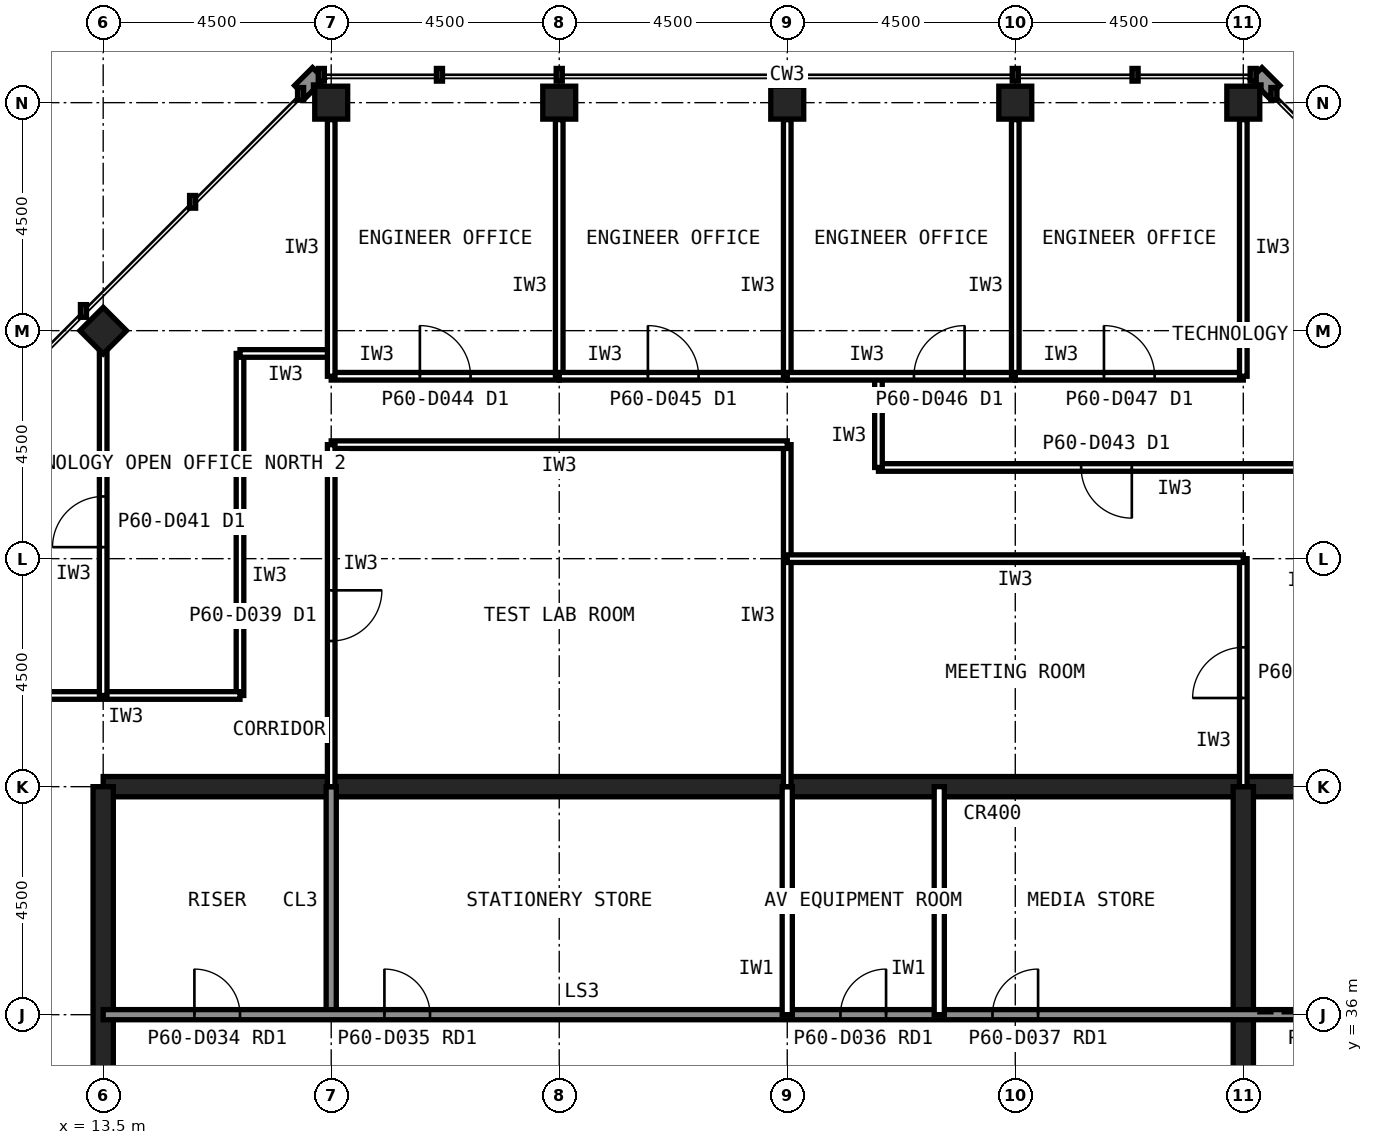
"""IFC4 building model, lengths in metres.
Left out: names, types, materials, properties, quantities, classifications, styles, units other than length and angle.
Written with IfcOpenShell. Run it as: python <this file> out.ifc"""

import sys

from ifc_helpers import new_model, si_unit, direction, frame, frame_2d, origin, origin_2d, place, context, subcontext, project, spatial, rectangle, hollow_rectangle, extrude, element, fill, save


model = new_model("IFC4")
c1 = context("Model", 3, precision=1e-05, world=origin(), true_north=direction((0.0, 1.0)))
c2 = subcontext(c1, "Body", "Model", "MODEL_VIEW")
j1 = project(units=[si_unit("LENGTHUNIT", "METRE"), si_unit("PLANEANGLEUNIT", "RADIAN")], contexts=[c1])
p1 = place(None, origin())
s1 = spatial("IfcSite", under=j1, at=p1, CompositionType="ELEMENT")
p2 = place(p1, origin())
s2 = spatial("IfcBuilding", under=s1, at=p2, CompositionType="ELEMENT")
p3 = place(p2, frame((0.0, 0.0, 254.6)))
s3 = spatial("IfcBuildingStorey", under=s2, at=p3, CompositionType="ELEMENT", Elevation=254.6)
for number, where, z_axis, x_axis in (
    (1, (36.0, 54.0, 0.0), (0.0, 0.0, 1.0), (1.0, 0.0, 0.0)),
    (2, (31.5, 54.0, 0.0), (0.0, 0.0, 1.0), (1.0, 0.0, 0.0)),
    (3, (27.0, 54.0, 0.0), (0.0, 0.0, 1.0), (1.0, 0.0, 0.0)),
    (4, (22.5, 54.0, 0.0), (0.0, 0.0, 1.0), (1.0, 0.0, 0.0)),
    (5, (18.0, 54.0, 0.0), (0.0, 0.0, 1.0), (1.0, 0.0, 0.0)),
    (6, (13.5, 49.5, 0.0), (0.0, 0.0, 1.0), (0.707, 0.707, 0.0)),
):
    element("IfcColumn", number, at=place(p3, frame(where, z_axis=z_axis, x_axis=x_axis)), inside=s3, PredefinedType="COLUMN", context=c2, shape_type="SweptSolid", body=[
        extrude(hollow_rectangle(XDim=0.65, YDim=0.65, WallThickness=0.032, at=origin_2d()), origin(), (0.0, 0.0, 1.0), 4.0),
    ])
p4 = place(p3, frame((40.5, 40.5, 0.0), z_axis=(0.0, 0.0, 1.0), x_axis=(-1.0, 0.0, 0.0)))
e7 = element("IfcWall", 7, at=p4, inside=s3, PredefinedType="SHEAR", context=c2, shape_type="SweptSolid", body=[
    extrude(rectangle(XDim=27.0, YDim=0.4, at=frame_2d((13.5, 0.0))), origin(), (0.0, 0.0, 1.0), 4.0),
])
p5 = place(p3, frame((13.5, 40.5, 0.0), z_axis=(0.0, 0.0, 1.0), x_axis=(0.0, -1.0, 0.0)))
e8 = element("IfcWall", 8, at=p5, inside=s3, PredefinedType="SHEAR", context=c2, shape_type="SweptSolid", body=[
    extrude(rectangle(XDim=27.0, YDim=0.4, at=frame_2d((13.5, 0.0))), origin(), (0.0, 0.0, 1.0), 4.0),
])
p6 = place(p5, frame((19.65, 0.0, 0.0)))
e9 = element("IfcOpeningElement", 9, at=p6, cuts=e8, PredefinedType="OPENING", context=c2, shape_type="SweptSolid", body=[
    extrude(rectangle(XDim=1.2, YDim=2.1, at=frame_2d((0.6, 1.05))), frame((0.0, 0.21, 0.0), z_axis=(0.0, -1.0, 0.0), x_axis=(1.0, 0.0, 0.0)), (0.0, 0.0, 1.0), 0.42),
])
p7 = place(p5, frame((5.85, 0.0, 0.0)))
e10 = element("IfcOpeningElement", 10, at=p7, cuts=e8, PredefinedType="OPENING", context=c2, shape_type="SweptSolid", body=[
    extrude(rectangle(XDim=1.8, YDim=2.1, at=frame_2d((0.9, 1.05))), frame((0.0, 0.21, 0.0), z_axis=(0.0, -1.0, 0.0), x_axis=(1.0, 0.0, 0.0)), (0.0, 0.0, 1.0), 0.42),
])
p8 = place(p3, frame((18.0, 36.0, 0.0), z_axis=(0.0, 0.0, 1.0), x_axis=(0.0, 1.0, 0.0)))
e11 = element("IfcWall", 11, at=p8, inside=s3, PredefinedType="SOLIDWALL", context=c2, shape_type="SweptSolid", body=[
    extrude(rectangle(XDim=4.5, YDim=0.2, at=frame_2d((2.25, 0.0))), origin(), (0.0, 0.0, 1.0), 3.84),
])
p9 = place(p3, frame((36.0, 22.5, 0.0), z_axis=(0.0, 0.0, 1.0), x_axis=(0.0, 1.0, 0.0)))
e12 = element("IfcWall", 12, at=p9, inside=s3, PredefinedType="SHEAR", context=c2, shape_type="SweptSolid", body=[
    extrude(rectangle(XDim=18.0, YDim=0.4, at=frame_2d((9.0, 0.0))), origin(), (0.0, 0.0, 1.0), 4.0),
])
p10 = place(p3, frame((13.5, 36.0, 0.0), z_axis=(0.0, 0.0, 1.0), x_axis=(1.0, 0.0, 0.0)))
e13 = element("IfcWall", 13, at=p10, inside=s3, PredefinedType="SOLIDWALL", context=c2, shape_type="SweptSolid", body=[
    extrude(rectangle(XDim=27.0, YDim=0.2, at=frame_2d((13.5, 0.0))), origin(), (0.0, 0.0, 1.0), 3.84),
])
p11 = place(p10, frame((1.8, 0.0, 0.0)))
e14 = element("IfcOpeningElement", 14, at=p11, cuts=e13, PredefinedType="OPENING", context=c2, shape_type="SweptSolid", body=[
    extrude(rectangle(XDim=0.9, YDim=2.1, at=frame_2d((0.45, 1.05))), frame((0.0, 0.11, 0.0), z_axis=(0.0, -1.0, 0.0), x_axis=(1.0, 0.0, 0.0)), (0.0, 0.0, 1.0), 0.22),
])
p12 = place(p10, frame((5.55, 0.0, 0.0)))
e15 = element("IfcOpeningElement", 15, at=p12, cuts=e13, PredefinedType="OPENING", context=c2, shape_type="SweptSolid", body=[
    extrude(rectangle(XDim=0.9, YDim=2.1, at=frame_2d((0.45, 1.05))), frame((0.0, 0.11, 0.0), z_axis=(0.0, -1.0, 0.0), x_axis=(1.0, 0.0, 0.0)), (0.0, 0.0, 1.0), 0.22),
])
p13 = place(p10, frame((14.55, 0.0, 0.0)))
e16 = element("IfcOpeningElement", 16, at=p13, cuts=e13, PredefinedType="OPENING", context=c2, shape_type="SweptSolid", body=[
    extrude(rectangle(XDim=0.9, YDim=2.1, at=frame_2d((0.45, 1.05))), frame((0.0, 0.11, 0.0), z_axis=(0.0, -1.0, 0.0), x_axis=(1.0, 0.0, 0.0)), (0.0, 0.0, 1.0), 0.22),
])
p14 = place(p10, frame((17.55, 0.0, 0.0)))
e17 = element("IfcOpeningElement", 17, at=p14, cuts=e13, PredefinedType="OPENING", context=c2, shape_type="SweptSolid", body=[
    extrude(rectangle(XDim=0.9, YDim=2.1, at=frame_2d((0.45, 1.05))), frame((0.0, 0.11, 0.0), z_axis=(0.0, -1.0, 0.0), x_axis=(1.0, 0.0, 0.0)), (0.0, 0.0, 1.0), 0.22),
])
p15 = place(p10, frame((24.1, 0.0, 0.0)))
e18 = element("IfcOpeningElement", 18, at=p15, cuts=e13, PredefinedType="OPENING", context=c2, shape_type="SweptSolid", body=[
    extrude(rectangle(XDim=1.3, YDim=2.2, at=frame_2d((0.65, 1.1))), frame((0.0, 0.11, 0.0), z_axis=(0.0, -1.0, 0.0), x_axis=(1.0, 0.0, 0.0)), (0.0, 0.0, 1.0), 0.22),
])
for number, where, z_axis, x_axis in (
    (19, (27.0, 36.0, 0.0), (0.0, 0.0, 1.0), (0.0, 1.0, 0.0)),
    (20, (30.0, 36.0, 0.0), (0.0, 0.0, 1.0), (0.0, 1.0, 0.0)),
):
    element("IfcWall", number, at=place(p3, frame(where, z_axis=z_axis, x_axis=x_axis)), inside=s3, PredefinedType="PARTITIONING", context=c2, shape_type="SweptSolid", body=[
        extrude(rectangle(XDim=4.5, YDim=0.2, at=frame_2d((2.25, 0.0))), origin(), (0.0, 0.0, 1.0), 3.84),
    ])
p16 = place(p3, frame((37.8, 46.8, 0.0), z_axis=(0.0, 0.0, 1.0), x_axis=(-1.0, 0.0, 0.0)))
e21 = element("IfcWall", 21, at=p16, inside=s3, PredefinedType="PARTITIONING", context=c2, shape_type="SweptSolid", body=[
    extrude(rectangle(XDim=9.0, YDim=0.15, at=frame_2d((4.5, 0.0))), origin(), (0.0, 0.0, 1.0), 3.84),
])
p17 = place(p16, frame((4.0, 0.0, 0.0)))
e22 = element("IfcOpeningElement", 22, at=p17, cuts=e21, PredefinedType="OPENING", context=c2, shape_type="SweptSolid", body=[
    extrude(rectangle(XDim=1.0, YDim=2.1, at=frame_2d((0.5, 1.05))), frame((0.0, 0.085, 0.0), z_axis=(0.0, -1.0, 0.0), x_axis=(1.0, 0.0, 0.0)), (0.0, 0.0, 1.0), 0.17),
])
p18 = place(p3, frame((16.2, 49.05, 0.0), z_axis=(0.0, 0.0, 1.0), x_axis=(0.0, -1.0, 0.0)))
e23 = element("IfcWall", 23, at=p18, inside=s3, PredefinedType="PARTITIONING", context=c2, shape_type="SweptSolid", body=[
    extrude(rectangle(XDim=6.75, YDim=0.15, at=frame_2d((3.375, 0.0))), origin(), (0.0, 0.0, 1.0), 3.84),
])
p19 = place(p3, frame((16.2, 42.3, 0.0), z_axis=(0.0, 0.0, 1.0), x_axis=(-1.0, 0.0, 0.0)))
e24 = element("IfcWall", 24, at=p19, inside=s3, PredefinedType="PARTITIONING", context=c2, shape_type="SweptSolid", body=[
    extrude(rectangle(XDim=4.5, YDim=0.15, at=frame_2d((2.25, 0.0))), origin(), (0.0, 0.0, 1.0), 3.84),
])
for number, where, z_axis, x_axis in (
    (25, (18.0, 49.05, 0.0), (0.0, 0.0, 1.0), (-1.0, 0.0, 0.0)),
    (26, (28.8, 46.8, 0.0), (0.0, 0.0, 1.0), (0.0, 1.0, 0.0)),
):
    element("IfcWall", number, at=place(p3, frame(where, z_axis=z_axis, x_axis=x_axis)), inside=s3, PredefinedType="PARTITIONING", context=c2, shape_type="SweptSolid", body=[
        extrude(rectangle(XDim=1.8, YDim=0.15, at=frame_2d((0.9, 0.0))), origin(), (0.0, 0.0, 1.0), 3.84),
    ])
p20 = place(p3, frame((27.0, 40.5, 0.0), z_axis=(0.0, 0.0, 1.0), x_axis=(0.0, 1.0, 0.0)))
e27 = element("IfcWall", 27, at=p20, inside=s3, PredefinedType="PARTITIONING", context=c2, shape_type="SweptSolid", body=[
    extrude(rectangle(XDim=6.75, YDim=0.15, at=frame_2d((3.375, 0.0))), origin(), (0.0, 0.0, 1.0), 2.989),
])
p21 = place(p3, frame((27.0, 47.25, 0.0), z_axis=(0.0, 0.0, 1.0), x_axis=(-1.0, 0.0, 0.0)))
e28 = element("IfcWall", 28, at=p21, inside=s3, PredefinedType="PARTITIONING", context=c2, shape_type="SweptSolid", body=[
    extrude(rectangle(XDim=9.0, YDim=0.15, at=frame_2d((4.5, 0.0))), origin(), (0.0, 0.0, 1.0), 3.84),
])
p22 = place(p3, frame((18.0, 47.25, 0.0), z_axis=(0.0, 0.0, 1.0), x_axis=(0.0, -1.0, 0.0)))
e29 = element("IfcWall", 29, at=p22, inside=s3, PredefinedType="PARTITIONING", context=c2, shape_type="SweptSolid", body=[
    extrude(rectangle(XDim=6.75, YDim=0.15, at=frame_2d((3.375, 0.0))), origin(), (0.0, 0.0, 1.0), 2.989),
])
p23 = place(p22, frame((2.875, 0.0, 0.0)))
e30 = element("IfcOpeningElement", 30, at=p23, cuts=e29, PredefinedType="OPENING", context=c2, shape_type="SweptSolid", body=[
    extrude(rectangle(XDim=1.0, YDim=2.1, at=frame_2d((0.5, 1.05))), frame((0.0, 0.085, 0.0), z_axis=(0.0, -1.0, 0.0), x_axis=(1.0, 0.0, 0.0)), (0.0, 0.0, 1.0), 0.17),
])
p24 = place(p3, frame((36.0, 40.5, 0.0), z_axis=(0.0, 0.0, 1.0), x_axis=(0.0, 1.0, 0.0)))
e31 = element("IfcWall", 31, at=p24, inside=s3, PredefinedType="PARTITIONING", context=c2, shape_type="SweptSolid", body=[
    extrude(rectangle(XDim=4.5, YDim=0.15, at=frame_2d((2.25, 0.0))), origin(), (0.0, 0.0, 1.0), 2.989),
])
p25 = place(p24, frame((1.75, 0.0, 0.0)))
e32 = element("IfcOpeningElement", 32, at=p25, cuts=e31, PredefinedType="OPENING", context=c2, shape_type="SweptSolid", body=[
    extrude(rectangle(XDim=1.0, YDim=2.1, at=frame_2d((0.5, 1.05))), frame((0.0, 0.085, 0.0), z_axis=(0.0, -1.0, 0.0), x_axis=(1.0, 0.0, 0.0)), (0.0, 0.0, 1.0), 0.17),
])
p26 = place(p3, frame((36.0, 45.0, 0.0), z_axis=(0.0, 0.0, 1.0), x_axis=(-1.0, 0.0, 0.0)))
e33 = element("IfcWall", 33, at=p26, inside=s3, PredefinedType="PARTITIONING", context=c2, shape_type="SweptSolid", body=[
    extrude(rectangle(XDim=9.0, YDim=0.15, at=frame_2d((4.5, 0.0))), origin(), (0.0, 0.0, 1.0), 3.84),
])
p27 = place(p3, frame((18.0, 48.6, 0.0), z_axis=(0.0, 0.0, 1.0), x_axis=(1.0, 0.0, 0.0)))
e34 = element("IfcWall", 34, at=p27, inside=s3, PredefinedType="PARTITIONING", context=c2, shape_type="SweptSolid", body=[
    extrude(rectangle(XDim=4.5, YDim=0.15, at=frame_2d((2.25, 0.0))), origin(), (0.0, 0.0, 1.0), 3.84),
])
p28 = place(p27, frame((1.75, 0.0, 0.0)))
e35 = element("IfcOpeningElement", 35, at=p28, cuts=e34, PredefinedType="OPENING", context=c2, shape_type="SweptSolid", body=[
    extrude(rectangle(XDim=1.0, YDim=2.1, at=frame_2d((0.5, 1.05))), frame((0.0, 0.085, 0.0), z_axis=(0.0, -1.0, 0.0), x_axis=(1.0, 0.0, 0.0)), (0.0, 0.0, 1.0), 0.17),
])
for number, where, z_axis, x_axis in (
    (36, (22.5, 48.6, 0.0), (0.0, 0.0, 1.0), (0.0, 1.0, 0.0)),
    (37, (18.0, 53.665, 0.0), (0.0, 0.0, 1.0), (0.0, -1.0, 0.0)),
):
    element("IfcWall", number, at=place(p3, frame(where, z_axis=z_axis, x_axis=x_axis)), inside=s3, PredefinedType="PARTITIONING", context=c2, shape_type="SweptSolid", body=[
        extrude(rectangle(XDim=5.065, YDim=0.15, at=frame_2d((2.532, 0.0))), origin(), (0.0, 0.0, 1.0), 2.989),
    ])
p29 = place(p3, frame((22.5, 48.6, 0.0), z_axis=(0.0, 0.0, 1.0), x_axis=(1.0, 0.0, 0.0)))
e38 = element("IfcWall", 38, at=p29, inside=s3, PredefinedType="PARTITIONING", context=c2, shape_type="SweptSolid", body=[
    extrude(rectangle(XDim=4.5, YDim=0.15, at=frame_2d((2.25, 0.0))), origin(), (0.0, 0.0, 1.0), 3.84),
])
p30 = place(p29, frame((1.75, 0.0, 0.0)))
e39 = element("IfcOpeningElement", 39, at=p30, cuts=e38, PredefinedType="OPENING", context=c2, shape_type="SweptSolid", body=[
    extrude(rectangle(XDim=1.0, YDim=2.1, at=frame_2d((0.5, 1.05))), frame((0.0, 0.085, 0.0), z_axis=(0.0, -1.0, 0.0), x_axis=(1.0, 0.0, 0.0)), (0.0, 0.0, 1.0), 0.17),
])
p31 = place(p3, frame((27.0, 48.6, 0.0), z_axis=(0.0, 0.0, 1.0), x_axis=(0.0, 1.0, 0.0)))
e40 = element("IfcWall", 40, at=p31, inside=s3, PredefinedType="PARTITIONING", context=c2, shape_type="SweptSolid", body=[
    extrude(rectangle(XDim=5.065, YDim=0.15, at=frame_2d((2.532, 0.0))), origin(), (0.0, 0.0, 1.0), 2.989),
])
p32 = place(p3, frame((27.0, 48.6, 0.0), z_axis=(0.0, 0.0, 1.0), x_axis=(1.0, 0.0, 0.0)))
e41 = element("IfcWall", 41, at=p32, inside=s3, PredefinedType="PARTITIONING", context=c2, shape_type="SweptSolid", body=[
    extrude(rectangle(XDim=4.5, YDim=0.15, at=frame_2d((2.25, 0.0))), origin(), (0.0, 0.0, 1.0), 3.84),
])
p33 = place(p32, frame((2.5, 0.0, 0.0)))
e42 = element("IfcOpeningElement", 42, at=p33, cuts=e41, PredefinedType="OPENING", context=c2, shape_type="SweptSolid", body=[
    extrude(rectangle(XDim=1.0, YDim=2.1, at=frame_2d((0.5, 1.05))), frame((0.0, 0.085, 0.0), z_axis=(0.0, -1.0, 0.0), x_axis=(1.0, 0.0, 0.0)), (0.0, 0.0, 1.0), 0.17),
])
p34 = place(p3, frame((31.5, 48.6, 0.0), z_axis=(0.0, 0.0, 1.0), x_axis=(0.0, 1.0, 0.0)))
e43 = element("IfcWall", 43, at=p34, inside=s3, PredefinedType="PARTITIONING", context=c2, shape_type="SweptSolid", body=[
    extrude(rectangle(XDim=5.065, YDim=0.15, at=frame_2d((2.532, 0.0))), origin(), (0.0, 0.0, 1.0), 2.989),
])
p35 = place(p3, frame((31.5, 48.6, 0.0), z_axis=(0.0, 0.0, 1.0), x_axis=(1.0, 0.0, 0.0)))
e44 = element("IfcWall", 44, at=p35, inside=s3, PredefinedType="PARTITIONING", context=c2, shape_type="SweptSolid", body=[
    extrude(rectangle(XDim=4.5, YDim=0.15, at=frame_2d((2.25, 0.0))), origin(), (0.0, 0.0, 1.0), 3.84),
])
p36 = place(p35, frame((1.75, 0.0, 0.0)))
e45 = element("IfcOpeningElement", 45, at=p36, cuts=e44, PredefinedType="OPENING", context=c2, shape_type="SweptSolid", body=[
    extrude(rectangle(XDim=1.0, YDim=2.1, at=frame_2d((0.5, 1.05))), frame((0.0, 0.085, 0.0), z_axis=(0.0, -1.0, 0.0), x_axis=(1.0, 0.0, 0.0)), (0.0, 0.0, 1.0), 0.17),
])
p37 = place(p3, frame((36.0, 48.6, 0.0), z_axis=(0.0, 0.0, 1.0), x_axis=(0.0, 1.0, 0.0)))
e46 = element("IfcWall", 46, at=p37, inside=s3, PredefinedType="PARTITIONING", context=c2, shape_type="SweptSolid", body=[
    extrude(rectangle(XDim=5.065, YDim=0.15, at=frame_2d((2.532, 0.0))), origin(), (0.0, 0.0, 1.0), 2.989),
])
p38 = place(p3, frame((13.5, 42.3, 0.0), z_axis=(0.0, 0.0, 1.0), x_axis=(0.0, 1.0, 0.0)))
e47 = element("IfcWall", 47, at=p38, inside=s3, PredefinedType="PARTITIONING", context=c2, shape_type="SweptSolid", body=[
    extrude(rectangle(XDim=6.855, YDim=0.15, at=frame_2d((3.427, 0.0))), origin(), (0.0, 0.0, 1.0), 2.989),
])
p39 = place(p38, frame((2.927, 0.0, 0.0)))
e48 = element("IfcOpeningElement", 48, at=p39, cuts=e47, PredefinedType="OPENING", context=c2, shape_type="SweptSolid", body=[
    extrude(rectangle(XDim=1.0, YDim=2.1, at=frame_2d((0.5, 1.05))), frame((0.0, 0.085, 0.0), z_axis=(0.0, -1.0, 0.0), x_axis=(1.0, 0.0, 0.0)), (0.0, 0.0, 1.0), 0.17),
])
p40 = place(p11, origin())
e49 = element("IfcDoor", 49, at=p40, inside=s3, OperationType="SINGLE_SWING_LEFT", PredefinedType="DOOR", context=c2, shape_type="SweptSolid", body=[
    extrude(rectangle(XDim=0.9, YDim=2.1, at=frame_2d((0.45, 1.05))), frame((0.0, 0.025, 0.0), z_axis=(0.0, -1.0, 0.0), x_axis=(1.0, 0.0, 0.0)), (0.0, 0.0, 1.0), 0.05),
])
fill(e14, e49)
p41 = place(p12, origin())
e50 = element("IfcDoor", 50, at=p41, inside=s3, OperationType="SINGLE_SWING_LEFT", PredefinedType="DOOR", context=c2, shape_type="SweptSolid", body=[
    extrude(rectangle(XDim=0.9, YDim=2.1, at=frame_2d((0.45, 1.05))), frame((0.0, 0.025, 0.0), z_axis=(0.0, -1.0, 0.0), x_axis=(1.0, 0.0, 0.0)), (0.0, 0.0, 1.0), 0.05),
])
fill(e15, e50)
p42 = place(p13, origin())
e51 = element("IfcDoor", 51, at=p42, inside=s3, OperationType="SINGLE_SWING_RIGHT", PredefinedType="DOOR", context=c2, shape_type="SweptSolid", body=[
    extrude(rectangle(XDim=0.9, YDim=2.1, at=frame_2d((0.45, 1.05))), frame((0.0, 0.025, 0.0), z_axis=(0.0, -1.0, 0.0), x_axis=(1.0, 0.0, 0.0)), (0.0, 0.0, 1.0), 0.05),
])
fill(e16, e51)
p43 = place(p14, origin())
e52 = element("IfcDoor", 52, at=p43, inside=s3, OperationType="SINGLE_SWING_RIGHT", PredefinedType="DOOR", context=c2, shape_type="SweptSolid", body=[
    extrude(rectangle(XDim=0.9, YDim=2.1, at=frame_2d((0.45, 1.05))), frame((0.0, 0.025, 0.0), z_axis=(0.0, -1.0, 0.0), x_axis=(1.0, 0.0, 0.0)), (0.0, 0.0, 1.0), 0.05),
])
fill(e17, e52)
p44 = place(p17, origin())
e53 = element("IfcDoor", 53, at=p44, inside=s3, OperationType="SINGLE_SWING_LEFT", PredefinedType="DOOR", context=c2, shape_type="SweptSolid", body=[
    extrude(rectangle(XDim=1.0, YDim=2.1, at=frame_2d((0.5, 1.05))), frame((0.0, 0.025, 0.0), z_axis=(0.0, -1.0, 0.0), x_axis=(1.0, 0.0, 0.0)), (0.0, 0.0, 1.0), 0.05),
])
fill(e22, e53)
p45 = place(p23, origin())
e54 = element("IfcDoor", 54, at=p45, inside=s3, OperationType="SINGLE_SWING_LEFT", PredefinedType="DOOR", context=c2, shape_type="SweptSolid", body=[
    extrude(rectangle(XDim=1.0, YDim=2.1, at=frame_2d((0.5, 1.05))), frame((0.0, 0.025, 0.0), z_axis=(0.0, -1.0, 0.0), x_axis=(1.0, 0.0, 0.0)), (0.0, 0.0, 1.0), 0.05),
])
fill(e30, e54)
p46 = place(p25, origin())
e55 = element("IfcDoor", 55, at=p46, inside=s3, OperationType="SINGLE_SWING_LEFT", PredefinedType="DOOR", context=c2, shape_type="SweptSolid", body=[
    extrude(rectangle(XDim=1.0, YDim=2.1, at=frame_2d((0.5, 1.05))), frame((0.0, 0.025, 0.0), z_axis=(0.0, -1.0, 0.0), x_axis=(1.0, 0.0, 0.0)), (0.0, 0.0, 1.0), 0.05),
])
fill(e32, e55)
p47 = place(p28, origin())
e56 = element("IfcDoor", 56, at=p47, inside=s3, OperationType="SINGLE_SWING_LEFT", PredefinedType="DOOR", context=c2, shape_type="SweptSolid", body=[
    extrude(rectangle(XDim=1.0, YDim=2.1, at=frame_2d((0.5, 1.05))), frame((0.0, 0.025, 0.0), z_axis=(0.0, -1.0, 0.0), x_axis=(1.0, 0.0, 0.0)), (0.0, 0.0, 1.0), 0.05),
])
fill(e35, e56)
p48 = place(p30, origin())
e57 = element("IfcDoor", 57, at=p48, inside=s3, OperationType="SINGLE_SWING_LEFT", PredefinedType="DOOR", context=c2, shape_type="SweptSolid", body=[
    extrude(rectangle(XDim=1.0, YDim=2.1, at=frame_2d((0.5, 1.05))), frame((0.0, 0.025, 0.0), z_axis=(0.0, -1.0, 0.0), x_axis=(1.0, 0.0, 0.0)), (0.0, 0.0, 1.0), 0.05),
])
fill(e39, e57)
p49 = place(p33, origin())
e58 = element("IfcDoor", 58, at=p49, inside=s3, OperationType="SINGLE_SWING_RIGHT", PredefinedType="DOOR", context=c2, shape_type="SweptSolid", body=[
    extrude(rectangle(XDim=1.0, YDim=2.1, at=frame_2d((0.5, 1.05))), frame((0.0, 0.025, 0.0), z_axis=(0.0, -1.0, 0.0), x_axis=(1.0, 0.0, 0.0)), (0.0, 0.0, 1.0), 0.05),
])
fill(e42, e58)
p50 = place(p36, origin())
e59 = element("IfcDoor", 59, at=p50, inside=s3, OperationType="SINGLE_SWING_LEFT", PredefinedType="DOOR", context=c2, shape_type="SweptSolid", body=[
    extrude(rectangle(XDim=1.0, YDim=2.1, at=frame_2d((0.5, 1.05))), frame((0.0, 0.025, 0.0), z_axis=(0.0, -1.0, 0.0), x_axis=(1.0, 0.0, 0.0)), (0.0, 0.0, 1.0), 0.05),
])
fill(e45, e59)
p51 = place(p39, origin())
e60 = element("IfcDoor", 60, at=p51, inside=s3, OperationType="SINGLE_SWING_LEFT", PredefinedType="DOOR", context=c2, shape_type="SweptSolid", body=[
    extrude(rectangle(XDim=1.0, YDim=2.1, at=frame_2d((0.5, 1.05))), frame((0.0, 0.025, 0.0), z_axis=(0.0, -1.0, 0.0), x_axis=(1.0, 0.0, 0.0)), (0.0, 0.0, 1.0), 0.05),
])
fill(e48, e60)
save(model, sys.argv[1])
